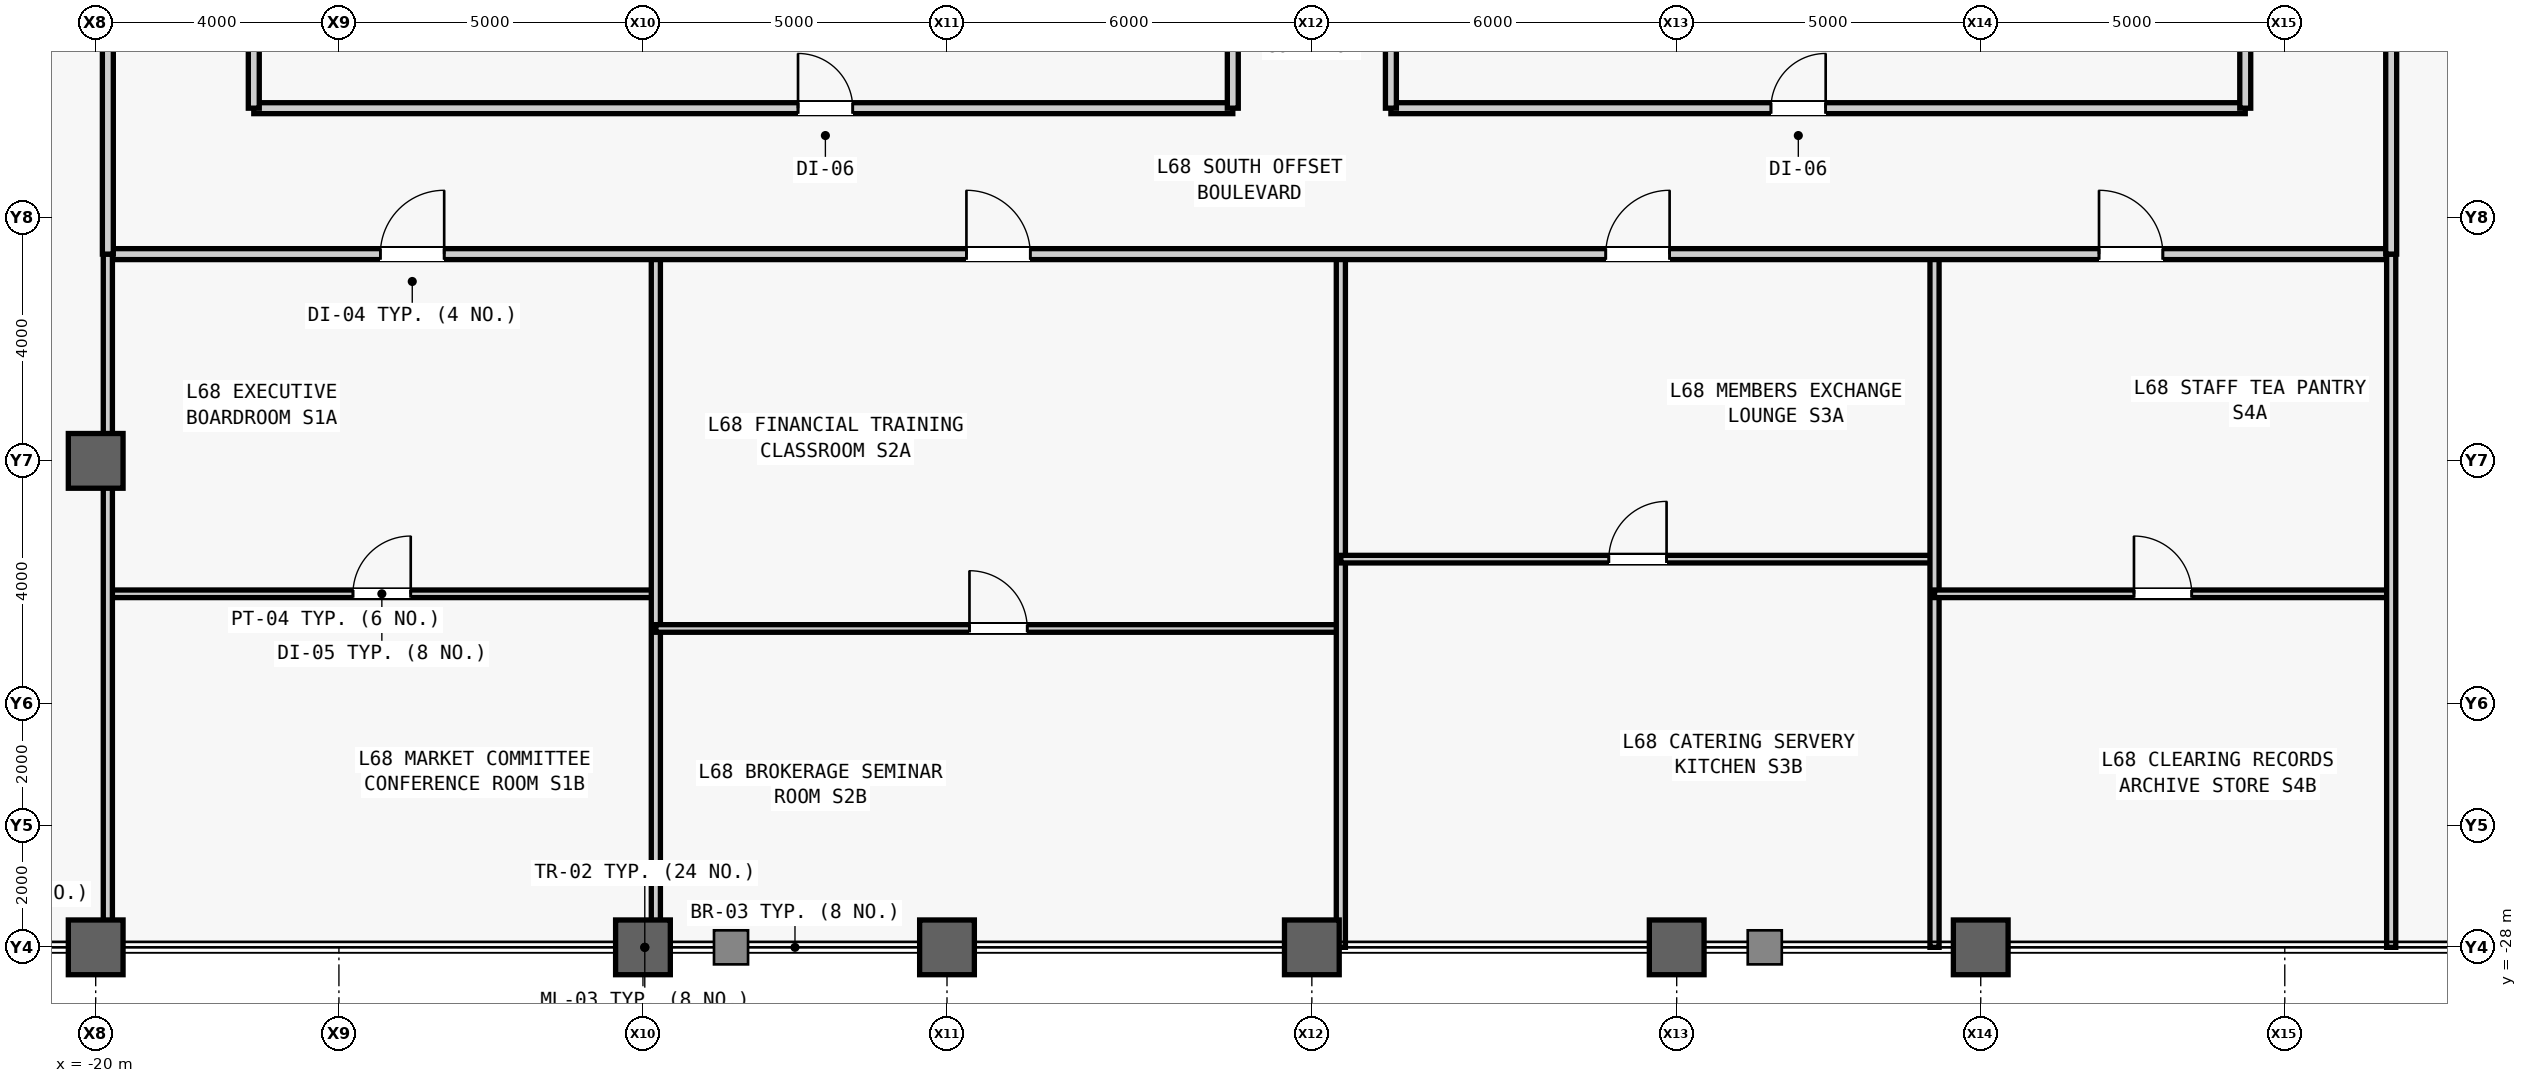
"""IFC4 building model, lengths in metres.
Left out: names, types, materials, properties, quantities, classifications, styles, units other than length and angle.
Written with IfcOpenShell. Run it as: python <this file> out.ifc"""

import sys

from ifc_helpers import new_model, si_unit, direction, frame, frame_2d, origin, origin_2d, place, context, subcontext, project, spatial, rectangle, hollow_rectangle, extrude, source, transform, mapped, element, fill, save


model = new_model("IFC4")
c1 = context("Model", 3, precision=1e-05, world=origin(), true_north=direction((0.0, 1.0)))
c2 = subcontext(c1, "Body", "Model", "MODEL_VIEW")
j1 = project(units=[si_unit("LENGTHUNIT", "METRE"), si_unit("PLANEANGLEUNIT", "RADIAN")], contexts=[c1])
p1 = place(None, origin())
s1 = spatial("IfcSite", under=j1, at=p1, CompositionType="ELEMENT")
p2 = place(p1, origin())
s2 = spatial("IfcBuilding", under=s1, at=p2, CompositionType="ELEMENT")
p3 = place(p2, frame((0.0, 0.0, 289.5)))
s3 = spatial("IfcBuildingStorey", under=s2, at=p3, CompositionType="ELEMENT", Elevation=289.5)
m1 = source(origin(), c2, "Body", "SweptSolid", [
    extrude(hollow_rectangle(XDim=0.9, YDim=0.9, WallThickness=0.05, at=origin_2d()), origin(), (0.0, 0.0, 1.0), 4.0),
])
for number, where, z_axis, x_axis in (
    (1, (-20.0, -28.0, 0.0), (0.0, 0.0, 1.0), (1.0, 0.0, 0.0)),
    (2, (-20.0, -20.0, 0.0), (0.0, 0.0, 1.0), (1.0, 0.0, 0.0)),
    (3, (-11.0, -28.0, 0.0), (0.0, 0.0, 1.0), (1.0, 0.0, 0.0)),
    (4, (-6.0, -28.0, 0.0), (0.0, 0.0, 1.0), (1.0, 0.0, 0.0)),
    (5, (0.0, -28.0, 0.0), (0.0, 0.0, 1.0), (1.0, 0.0, 0.0)),
    (6, (6.0, -28.0, 0.0), (0.0, 0.0, 1.0), (1.0, 0.0, 0.0)),
    (7, (11.0, -28.0, 0.0), (0.0, 0.0, 1.0), (1.0, 0.0, 0.0)),
):
    element("IfcColumn", number, at=place(p3, frame(where, z_axis=z_axis, x_axis=x_axis)), inside=s3, PredefinedType="COLUMN", context=c2, shape_type="MappedRepresentation", body=[
        mapped(m1, transform((0.0, 0.0, 0.0), scale=1.0)),
    ])
m2 = source(origin(), c2, "Body", "SweptSolid", [
    extrude(rectangle(XDim=16.1, YDim=0.18, at=frame_2d((8.05, 0.0))), origin(), (0.0, 0.0, 1.0), 3.78),
])
p4 = place(p3, frame((-17.4, -14.2, 0.0), z_axis=(0.0, 0.0, 1.0), x_axis=(1.0, 0.0, 0.0)))
e8 = element("IfcWall", 8, at=p4, inside=s3, PredefinedType="PARTITIONING", context=c2, shape_type="MappedRepresentation", body=[
    mapped(m2, transform((0.0, 0.0, 0.0), scale=1.0)),
])
m3 = source(origin(), c2, "Body", "SweptSolid", [
    extrude(rectangle(XDim=0.9, YDim=2.15, at=frame_2d((0.45, 1.075))), frame((0.0, 0.1, 0.0), z_axis=(0.0, -1.0, 0.0), x_axis=(1.0, 0.0, 0.0)), (0.0, 0.0, 1.0), 0.2),
])
p5 = place(p4, frame((8.95, 0.0, 0.0)))
e9 = element("IfcOpeningElement", 9, at=p5, cuts=e8, PredefinedType="OPENING", context=c2, shape_type="MappedRepresentation", body=[
    mapped(m3, transform((0.0, 0.0, 0.0), scale=1.0)),
])
m4 = source(origin(), c2, "Body", "SweptSolid", [
    extrude(rectangle(XDim=4.4, YDim=0.18, at=frame_2d((2.2, 0.0))), origin(), (0.0, 0.0, 1.0), 3.78),
])
p6 = place(p3, frame((-17.4, -14.2, 0.0), z_axis=(0.0, 0.0, 1.0), x_axis=(0.0, 1.0, 0.0)))
e10 = element("IfcWall", 10, at=p6, inside=s3, PredefinedType="PARTITIONING", context=c2, shape_type="MappedRepresentation", body=[
    mapped(m4, transform((0.0, 0.0, 0.0), scale=1.0)),
])
m5 = source(origin(), c2, "Body", "SweptSolid", [
    extrude(rectangle(XDim=3.2, YDim=0.18, at=frame_2d((1.6, 0.0))), origin(), (0.0, 0.0, 1.0), 3.78),
])
p7 = place(p3, frame((-1.3, -14.2, 0.0), z_axis=(0.0, 0.0, 1.0), x_axis=(0.0, 1.0, 0.0)))
e11 = element("IfcWall", 11, at=p7, inside=s3, PredefinedType="PARTITIONING", context=c2, shape_type="MappedRepresentation", body=[
    mapped(m5, transform((0.0, 0.0, 0.0), scale=1.0)),
])
m6 = source(origin(), c2, "Body", "SweptSolid", [
    extrude(rectangle(XDim=14.05, YDim=0.18, at=frame_2d((7.025, 0.0))), origin(), (0.0, 0.0, 1.0), 3.78),
])
p8 = place(p3, frame((1.3, -14.2, 0.0), z_axis=(0.0, 0.0, 1.0), x_axis=(1.0, 0.0, 0.0)))
e12 = element("IfcWall", 12, at=p8, inside=s3, PredefinedType="PARTITIONING", context=c2, shape_type="MappedRepresentation", body=[
    mapped(m6, transform((0.0, 0.0, 0.0), scale=1.0)),
])
p9 = place(p8, frame((6.25, 0.0, 0.0)))
e13 = element("IfcOpeningElement", 13, at=p9, cuts=e12, PredefinedType="OPENING", context=c2, shape_type="MappedRepresentation", body=[
    mapped(m3, transform((0.0, 0.0, 0.0), scale=1.0)),
])
p10 = place(p3, frame((1.3, -14.2, 0.0), z_axis=(0.0, 0.0, 1.0), x_axis=(0.0, 1.0, 0.0)))
e14 = element("IfcWall", 14, at=p10, inside=s3, PredefinedType="PARTITIONING", context=c2, shape_type="MappedRepresentation", body=[
    mapped(m5, transform((0.0, 0.0, 0.0), scale=1.0)),
])
m7 = source(origin(), c2, "Body", "SweptSolid", [
    extrude(rectangle(XDim=3.7, YDim=0.18, at=frame_2d((1.85, 0.0))), origin(), (0.0, 0.0, 1.0), 3.78),
])
p11 = place(p3, frame((15.35, -14.2, 0.0), z_axis=(0.0, 0.0, 1.0), x_axis=(0.0, 1.0, 0.0)))
e15 = element("IfcWall", 15, at=p11, inside=s3, PredefinedType="PARTITIONING", context=c2, shape_type="MappedRepresentation", body=[
    mapped(m7, transform((0.0, 0.0, 0.0), scale=1.0)),
])
m8 = source(origin(), c2, "Body", "SweptSolid", [
    extrude(rectangle(XDim=9.012, YDim=0.125, at=frame_2d((4.506, 0.0))), origin(), (0.0, 0.0, 1.0), 3.78),
])
p12 = place(p3, frame((-19.8, -22.186, 0.0), z_axis=(0.0, 0.0, 1.0), x_axis=(1.0, 0.0, 0.0)))
e16 = element("IfcWall", 16, at=p12, inside=s3, PredefinedType="PARTITIONING", context=c2, shape_type="MappedRepresentation", body=[
    mapped(m8, transform((0.0, 0.0, 0.0), scale=1.0)),
])
m9 = source(origin(), c2, "Body", "SweptSolid", [
    extrude(rectangle(XDim=0.95, YDim=2.15, at=frame_2d((0.475, 1.075))), frame((0.0, 0.073, 0.0), z_axis=(0.0, -1.0, 0.0), x_axis=(1.0, 0.0, 0.0)), (0.0, 0.0, 1.0), 0.145),
])
p13 = place(p12, frame((4.031, 0.0, 0.0)))
e17 = element("IfcOpeningElement", 17, at=p13, cuts=e16, PredefinedType="OPENING", context=c2, shape_type="MappedRepresentation", body=[
    mapped(m9, transform((0.0, 0.0, 0.0), scale=1.0)),
])
m10 = source(origin(), c2, "Body", "SweptSolid", [
    extrude(rectangle(XDim=11.4, YDim=0.15, at=frame_2d((5.7, 0.0))), origin(), (0.0, 0.0, 1.0), 3.085),
])
p14 = place(p3, frame((-10.788, -28.0, 0.0), z_axis=(0.0, 0.0, 1.0), x_axis=(0.0, 1.0, 0.0)))
e18 = element("IfcWall", 18, at=p14, inside=s3, PredefinedType="PARTITIONING", context=c2, shape_type="MappedRepresentation", body=[
    mapped(m10, transform((0.0, 0.0, 0.0), scale=1.0)),
])
m11 = source(origin(), c2, "Body", "SweptSolid", [
    extrude(rectangle(XDim=11.265, YDim=0.125, at=frame_2d((5.633, 0.0))), origin(), (0.0, 0.0, 1.0), 3.78),
])
p15 = place(p3, frame((-10.788, -22.756, 0.0), z_axis=(0.0, 0.0, 1.0), x_axis=(1.0, 0.0, 0.0)))
e19 = element("IfcWall", 19, at=p15, inside=s3, PredefinedType="PARTITIONING", context=c2, shape_type="MappedRepresentation", body=[
    mapped(m11, transform((0.0, 0.0, 0.0), scale=1.0)),
])
p16 = place(p15, frame((5.157, 0.0, 0.0)))
e20 = element("IfcOpeningElement", 20, at=p16, cuts=e19, PredefinedType="OPENING", context=c2, shape_type="MappedRepresentation", body=[
    mapped(m9, transform((0.0, 0.0, 0.0), scale=1.0)),
])
m12 = source(origin(), c2, "Body", "SweptSolid", [
    extrude(rectangle(XDim=11.4, YDim=0.15, at=frame_2d((5.7, 0.0))), origin(), (0.0, 0.0, 1.0), 3.78),
])
p17 = place(p3, frame((0.477, -28.0, 0.0), z_axis=(0.0, 0.0, 1.0), x_axis=(0.0, 1.0, 0.0)))
e21 = element("IfcWall", 21, at=p17, inside=s3, PredefinedType="PARTITIONING", context=c2, shape_type="MappedRepresentation", body=[
    mapped(m12, transform((0.0, 0.0, 0.0), scale=1.0)),
])
m13 = source(origin(), c2, "Body", "SweptSolid", [
    extrude(rectangle(XDim=9.763, YDim=0.125, at=frame_2d((4.881, 0.0))), origin(), (0.0, 0.0, 1.0), 3.78),
])
p18 = place(p3, frame((0.477, -21.616, 0.0), z_axis=(0.0, 0.0, 1.0), x_axis=(1.0, 0.0, 0.0)))
e22 = element("IfcWall", 22, at=p18, inside=s3, PredefinedType="PARTITIONING", context=c2, shape_type="MappedRepresentation", body=[
    mapped(m13, transform((0.0, 0.0, 0.0), scale=1.0)),
])
p19 = place(p18, frame((4.406, 0.0, 0.0)))
e23 = element("IfcOpeningElement", 23, at=p19, cuts=e22, PredefinedType="OPENING", context=c2, shape_type="MappedRepresentation", body=[
    mapped(m9, transform((0.0, 0.0, 0.0), scale=1.0)),
])
p20 = place(p3, frame((10.24, -28.0, 0.0), z_axis=(0.0, 0.0, 1.0), x_axis=(0.0, 1.0, 0.0)))
e24 = element("IfcWall", 24, at=p20, inside=s3, PredefinedType="PARTITIONING", context=c2, shape_type="MappedRepresentation", body=[
    mapped(m12, transform((0.0, 0.0, 0.0), scale=1.0)),
])
m14 = source(origin(), c2, "Body", "SweptSolid", [
    extrude(rectangle(XDim=7.51, YDim=0.125, at=frame_2d((3.755, 0.0))), origin(), (0.0, 0.0, 1.0), 3.78),
])
p21 = place(p3, frame((10.24, -22.186, 0.0), z_axis=(0.0, 0.0, 1.0), x_axis=(1.0, 0.0, 0.0)))
e25 = element("IfcWall", 25, at=p21, inside=s3, PredefinedType="PARTITIONING", context=c2, shape_type="MappedRepresentation", body=[
    mapped(m14, transform((0.0, 0.0, 0.0), scale=1.0)),
])
p22 = place(p21, frame((3.28, 0.0, 0.0)))
e26 = element("IfcOpeningElement", 26, at=p22, cuts=e25, PredefinedType="OPENING", context=c2, shape_type="MappedRepresentation", body=[
    mapped(m9, transform((0.0, 0.0, 0.0), scale=1.0)),
])
m15 = source(origin(), c2, "Body", "SweptSolid", [
    extrude(rectangle(XDim=37.55, YDim=0.18, at=frame_2d((18.775, 0.0))), origin(), (0.0, 0.0, 1.0), 3.78),
])
p23 = place(p3, frame((-19.8, -16.6, 0.0), z_axis=(0.0, 0.0, 1.0), x_axis=(1.0, 0.0, 0.0)))
e27 = element("IfcWall", 27, at=p23, inside=s3, PredefinedType="PARTITIONING", context=c2, shape_type="MappedRepresentation", body=[
    mapped(m15, transform((0.0, 0.0, 0.0), scale=1.0)),
])
m16 = source(origin(), c2, "Body", "SweptSolid", [
    extrude(rectangle(XDim=1.05, YDim=2.2, at=frame_2d((0.525, 1.1))), frame((0.0, 0.1, 0.0), z_axis=(0.0, -1.0, 0.0), x_axis=(1.0, 0.0, 0.0)), (0.0, 0.0, 1.0), 0.2),
])
p24 = place(p23, frame((4.481, 0.0, 0.0)))
e28 = element("IfcOpeningElement", 28, at=p24, cuts=e27, PredefinedType="OPENING", context=c2, shape_type="MappedRepresentation", body=[
    mapped(m16, transform((0.0, 0.0, 0.0), scale=1.0)),
])
p25 = place(p23, frame((14.119, 0.0, 0.0)))
e29 = element("IfcOpeningElement", 29, at=p25, cuts=e27, PredefinedType="OPENING", context=c2, shape_type="MappedRepresentation", body=[
    mapped(m16, transform((0.0, 0.0, 0.0), scale=1.0)),
])
p26 = place(p23, frame((24.634, 0.0, 0.0)))
e30 = element("IfcOpeningElement", 30, at=p26, cuts=e27, PredefinedType="OPENING", context=c2, shape_type="MappedRepresentation", body=[
    mapped(m16, transform((0.0, 0.0, 0.0), scale=1.0)),
])
p27 = place(p23, frame((32.745, 0.0, 0.0)))
e31 = element("IfcOpeningElement", 31, at=p27, cuts=e27, PredefinedType="OPENING", context=c2, shape_type="MappedRepresentation", body=[
    mapped(m16, transform((0.0, 0.0, 0.0), scale=1.0)),
])
m17 = source(origin(), c2, "Body", "SweptSolid", [
    extrude(rectangle(XDim=11.4, YDim=0.15, at=frame_2d((5.7, 0.0))), origin(), (0.0, 0.0, 1.0), 3.164),
])
p28 = place(p3, frame((-19.8, -28.0, 0.0), z_axis=(0.0, 0.0, 1.0), x_axis=(0.0, 1.0, 0.0)))
e32 = element("IfcWall", 32, at=p28, inside=s3, PredefinedType="PARTITIONING", context=c2, shape_type="MappedRepresentation", body=[
    mapped(m17, transform((0.0, 0.0, 0.0), scale=1.0)),
])
p29 = place(p3, frame((17.75, -28.0, 0.0), z_axis=(0.0, 0.0, 1.0), x_axis=(0.0, 1.0, 0.0)))
e33 = element("IfcWall", 33, at=p29, inside=s3, PredefinedType="PARTITIONING", context=c2, shape_type="MappedRepresentation", body=[
    mapped(m12, transform((0.0, 0.0, 0.0), scale=1.0)),
])
m18 = source(origin(), c2, "Body", "SweptSolid", [
    extrude(rectangle(XDim=39.1, YDim=0.18, at=frame_2d((19.55, 0.0))), origin(), (0.0, 0.0, 1.0), 3.164),
])
p30 = place(p3, frame((-19.8, -16.6, 0.0), z_axis=(0.0, 0.0, 1.0), x_axis=(0.0, 1.0, 0.0)))
e34 = element("IfcWall", 34, at=p30, inside=s3, PredefinedType="PARTITIONING", context=c2, shape_type="MappedRepresentation", body=[
    mapped(m18, transform((0.0, 0.0, 0.0), scale=1.0)),
])
m19 = source(origin(), c2, "Body", "SweptSolid", [
    extrude(rectangle(XDim=0.95, YDim=2.15, at=frame_2d((0.475, 1.075))), frame((0.0, 0.1, 0.0), z_axis=(0.0, -1.0, 0.0), x_axis=(1.0, 0.0, 0.0)), (0.0, 0.0, 1.0), 0.2),
])
p31 = place(p30, frame((7.589, 0.0, 0.0)))
e35 = element("IfcOpeningElement", 35, at=p31, cuts=e34, PredefinedType="OPENING", context=c2, shape_type="MappedRepresentation", body=[
    mapped(m19, transform((0.0, 0.0, 0.0), scale=1.0)),
])
p32 = place(p30, frame((17.719, 0.0, 0.0)))
e36 = element("IfcOpeningElement", 36, at=p32, cuts=e34, PredefinedType="OPENING", context=c2, shape_type="MappedRepresentation", body=[
    mapped(m19, transform((0.0, 0.0, 0.0), scale=1.0)),
])
p33 = place(p30, frame((26.955, 0.0, 0.0)))
e37 = element("IfcOpeningElement", 37, at=p33, cuts=e34, PredefinedType="OPENING", context=c2, shape_type="MappedRepresentation", body=[
    mapped(m19, transform((0.0, 0.0, 0.0), scale=1.0)),
])
m20 = source(origin(), c2, "Body", "SweptSolid", [
    extrude(rectangle(XDim=39.1, YDim=0.18, at=frame_2d((19.55, 0.0))), origin(), (0.0, 0.0, 1.0), 3.78),
])
p34 = place(p3, frame((17.75, -16.6, 0.0), z_axis=(0.0, 0.0, 1.0), x_axis=(0.0, 1.0, 0.0)))
e38 = element("IfcWall", 38, at=p34, inside=s3, PredefinedType="PARTITIONING", context=c2, shape_type="MappedRepresentation", body=[
    mapped(m20, transform((0.0, 0.0, 0.0), scale=1.0)),
])
p35 = place(p34, frame((15.825, 0.0, 0.0)))
e39 = element("IfcOpeningElement", 39, at=p35, cuts=e38, PredefinedType="OPENING", context=c2, shape_type="MappedRepresentation", body=[
    mapped(m19, transform((0.0, 0.0, 0.0), scale=1.0)),
])
m21 = source(origin(), c2, "Body", "SweptSolid", [
    extrude(rectangle(XDim=0.9, YDim=2.15, at=frame_2d((0.45, 1.075))), frame((0.0, 0.025, 0.0), z_axis=(0.0, -1.0, 0.0), x_axis=(1.0, 0.0, 0.0)), (0.0, 0.0, 1.0), 0.05),
])
p36 = place(p5, origin())
e40 = element("IfcDoor", 40, at=p36, inside=s3, OperationType="SINGLE_SWING_LEFT", PredefinedType="DOOR", context=c2, shape_type="MappedRepresentation", body=[
    mapped(m21, transform((0.0, 0.0, 0.0), scale=1.0)),
])
fill(e9, e40)
p37 = place(p9, origin())
e41 = element("IfcDoor", 41, at=p37, inside=s3, OperationType="SINGLE_SWING_RIGHT", PredefinedType="DOOR", context=c2, shape_type="MappedRepresentation", body=[
    mapped(m21, transform((0.0, 0.0, 0.0), scale=1.0)),
])
fill(e13, e41)
m22 = source(origin(), c2, "Body", "SweptSolid", [
    extrude(rectangle(XDim=0.95, YDim=2.15, at=frame_2d((0.475, 1.075))), frame((0.0, 0.025, 0.0), z_axis=(0.0, -1.0, 0.0), x_axis=(1.0, 0.0, 0.0)), (0.0, 0.0, 1.0), 0.05),
])
p38 = place(p13, origin())
e42 = element("IfcDoor", 42, at=p38, inside=s3, OperationType="SINGLE_SWING_RIGHT", PredefinedType="DOOR", context=c2, shape_type="MappedRepresentation", body=[
    mapped(m22, transform((0.0, 0.0, 0.0), scale=1.0)),
])
fill(e17, e42)
p39 = place(p16, origin())
e43 = element("IfcDoor", 43, at=p39, inside=s3, OperationType="SINGLE_SWING_LEFT", PredefinedType="DOOR", context=c2, shape_type="MappedRepresentation", body=[
    mapped(m22, transform((0.0, 0.0, 0.0), scale=1.0)),
])
fill(e20, e43)
p40 = place(p19, origin())
e44 = element("IfcDoor", 44, at=p40, inside=s3, OperationType="SINGLE_SWING_RIGHT", PredefinedType="DOOR", context=c2, shape_type="MappedRepresentation", body=[
    mapped(m22, transform((0.0, 0.0, 0.0), scale=1.0)),
])
fill(e23, e44)
p41 = place(p22, origin())
e45 = element("IfcDoor", 45, at=p41, inside=s3, OperationType="SINGLE_SWING_LEFT", PredefinedType="DOOR", context=c2, shape_type="MappedRepresentation", body=[
    mapped(m22, transform((0.0, 0.0, 0.0), scale=1.0)),
])
fill(e26, e45)
m23 = source(origin(), c2, "Body", "SweptSolid", [
    extrude(rectangle(XDim=1.05, YDim=2.2, at=frame_2d((0.525, 1.1))), frame((0.0, 0.025, 0.0), z_axis=(0.0, -1.0, 0.0), x_axis=(1.0, 0.0, 0.0)), (0.0, 0.0, 1.0), 0.05),
])
p42 = place(p24, origin())
e46 = element("IfcDoor", 46, at=p42, inside=s3, OperationType="SINGLE_SWING_RIGHT", PredefinedType="DOOR", context=c2, shape_type="MappedRepresentation", body=[
    mapped(m23, transform((0.0, 0.0, 0.0), scale=1.0)),
])
fill(e28, e46)
p43 = place(p25, origin())
e47 = element("IfcDoor", 47, at=p43, inside=s3, OperationType="SINGLE_SWING_LEFT", PredefinedType="DOOR", context=c2, shape_type="MappedRepresentation", body=[
    mapped(m23, transform((0.0, 0.0, 0.0), scale=1.0)),
])
fill(e29, e47)
p44 = place(p26, origin())
e48 = element("IfcDoor", 48, at=p44, inside=s3, OperationType="SINGLE_SWING_RIGHT", PredefinedType="DOOR", context=c2, shape_type="MappedRepresentation", body=[
    mapped(m23, transform((0.0, 0.0, 0.0), scale=1.0)),
])
fill(e30, e48)
p45 = place(p27, origin())
e49 = element("IfcDoor", 49, at=p45, inside=s3, OperationType="SINGLE_SWING_LEFT", PredefinedType="DOOR", context=c2, shape_type="MappedRepresentation", body=[
    mapped(m23, transform((0.0, 0.0, 0.0), scale=1.0)),
])
fill(e31, e49)
save(model, sys.argv[1])
